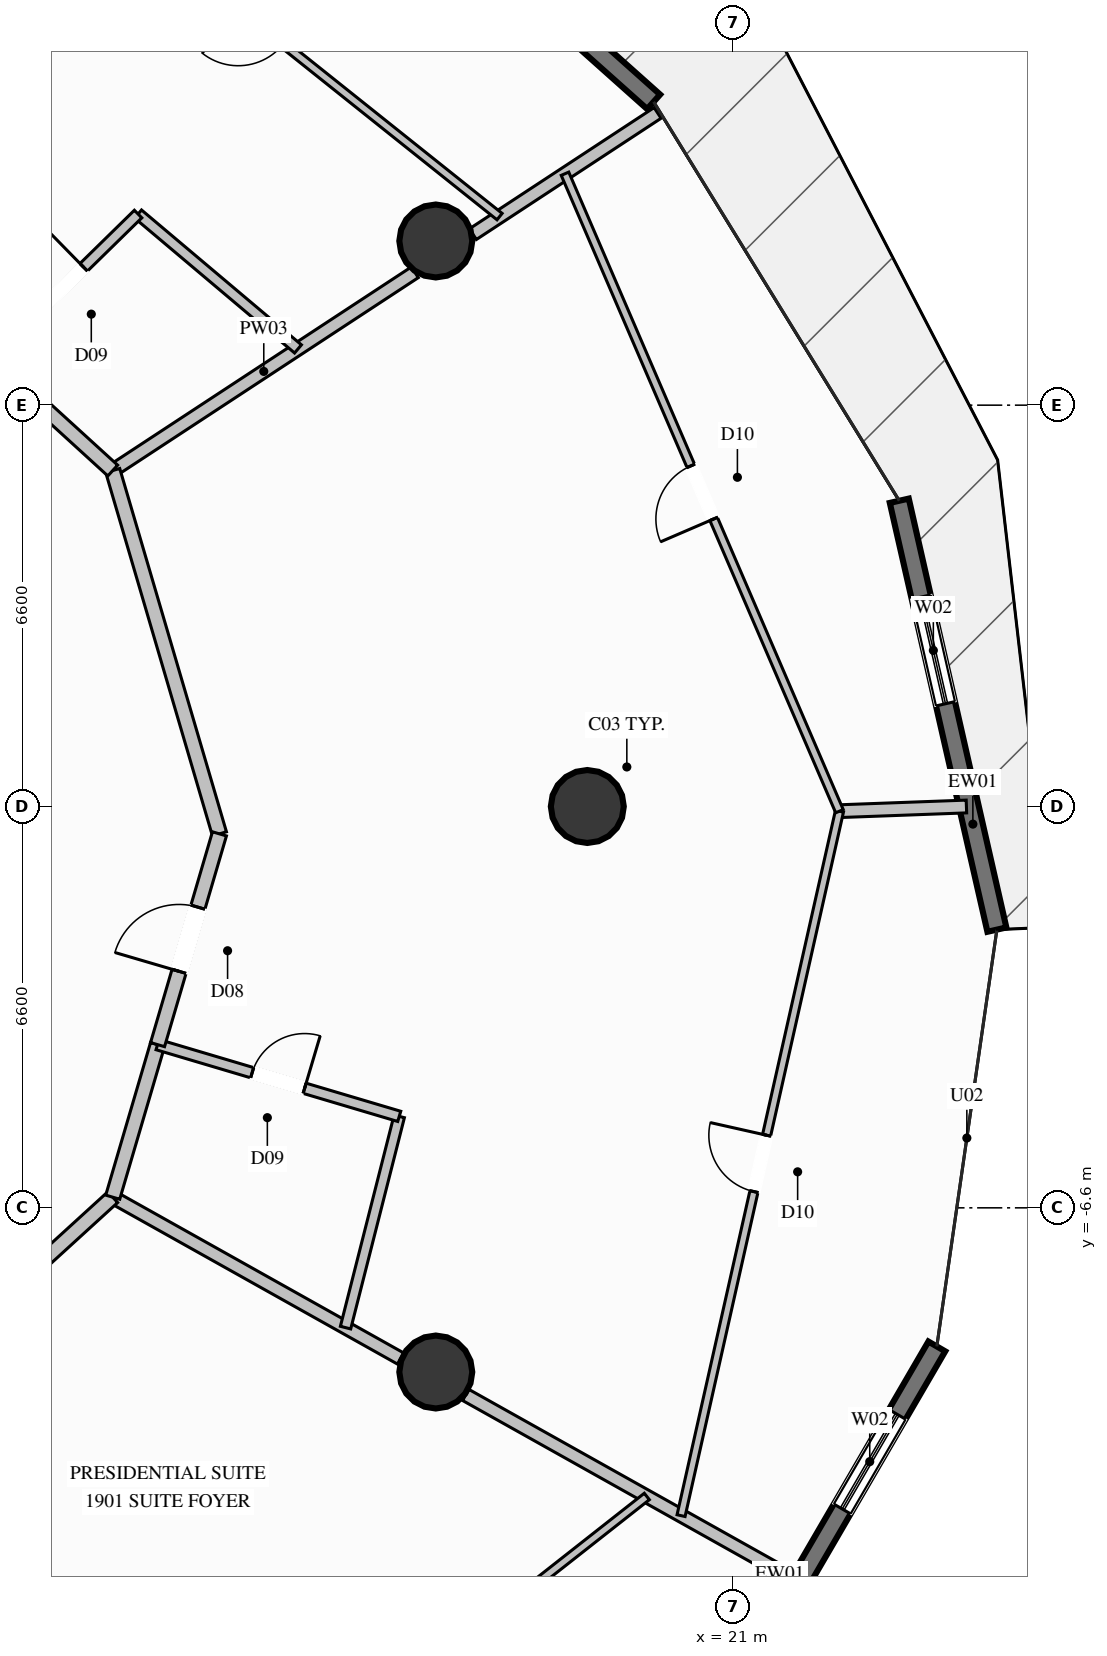
"""IFC4 building model, lengths in metres.
Left out: names, types, materials, properties, quantities, classifications, styles, units other than length and angle.
Written with IfcOpenShell. Run it as: python <this file> out.ifc"""

import sys

from ifc_helpers import new_model, si_unit, direction, frame, frame_2d, origin, origin_2d, place, context, subcontext, project, spatial, rectangle, circle, extrude, element, fill, save


model = new_model("IFC4")
c1 = context("Model", 3, precision=1e-05, world=origin(), true_north=direction((0.0, 1.0)))
c2 = subcontext(c1, "Body", "Model", "MODEL_VIEW")
j1 = project(units=[si_unit("LENGTHUNIT", "METRE"), si_unit("PLANEANGLEUNIT", "RADIAN")], contexts=[c1])
p1 = place(None, origin())
s1 = spatial("IfcSite", under=j1, at=p1, CompositionType="ELEMENT")
p2 = place(p1, origin())
s2 = spatial("IfcBuilding", under=s1, at=p2, CompositionType="ELEMENT")
p3 = place(p2, frame((0.0, 0.0, 71.6)))
s3 = spatial("IfcBuildingStorey", under=s2, at=p3, CompositionType="ELEMENT", Elevation=71.6)
for number, where, z_axis, x_axis in (
    (1, (18.6, 0.0, 0.0), (0.0, 0.0, 1.0), (1.0, 0.0, 0.0)),
    (2, (16.108, 9.3, 0.0), (0.0, 0.0, 1.0), (1.0, 0.0, 0.0)),
    (3, (16.108, -9.3, 0.0), (0.0, 0.0, 1.0), (1.0, 0.0, 0.0)),
):
    element("IfcColumn", number, at=place(p3, frame(where, z_axis=z_axis, x_axis=x_axis)), inside=s3, PredefinedType="COLUMN", context=c2, shape_type="SweptSolid", body=[
        extrude(circle(Radius=0.6, at=origin_2d()), origin(), (0.0, 0.0, 1.0), 3.6),
    ])
p4 = place(p3, frame((23.731, 5.028, 0.0), z_axis=(0.0, 0.0, 1.0), x_axis=(0.221888063911, -0.975072144558, 0.0)))
e4 = element("IfcWall", 4, at=p4, inside=s3, PredefinedType="SOLIDWALL", context=c2, shape_type="SweptSolid", body=[
    extrude(rectangle(XDim=7.233, YDim=0.32, at=frame_2d((3.617, 0.0))), origin(), (0.0, 0.0, 1.0), 3.34),
])
p5 = place(p4, frame((1.624, 0.0, 0.35)))
e5 = element("IfcOpeningElement", 5, at=p5, cuts=e4, PredefinedType="OPENING", context=c2, shape_type="SweptSolid", body=[
    extrude(rectangle(XDim=1.8, YDim=2.6, at=frame_2d((0.9, 1.3))), frame((0.0, 0.17, 0.0), z_axis=(0.0, -1.0, 0.0), x_axis=(1.0, 0.0, 0.0)), (0.0, 0.0, 1.0), 0.34),
])
p6 = place(p3, frame((13.61, 17.016, 0.0), z_axis=(0.0, 0.0, 1.0), x_axis=(0.746077425908, -0.665859200245, 0.0)))
e6 = element("IfcWall", 6, at=p6, inside=s3, PredefinedType="SOLIDWALL", context=c2, shape_type="SweptSolid", body=[
    extrude(rectangle(XDim=8.15, YDim=0.32, at=frame_2d((4.075, 0.0))), origin(), (0.0, 0.0, 1.0), 3.34),
])
p7 = place(p6, frame((3.175, 0.0, 0.35)))
e7 = element("IfcOpeningElement", 7, at=p7, cuts=e6, PredefinedType="OPENING", context=c2, shape_type="SweptSolid", body=[
    extrude(rectangle(XDim=1.8, YDim=2.6, at=frame_2d((0.9, 1.3))), frame((0.0, 0.17, 0.0), z_axis=(0.0, -1.0, 0.0), x_axis=(1.0, 0.0, 0.0)), (0.0, 0.0, 1.0), 0.34),
])
p8 = place(p3, frame((24.348, -8.879, 0.0), z_axis=(0.0, 0.0, 1.0), x_axis=(-0.503009446837, -0.864280912894, 0.0)))
e8 = element("IfcWall", 8, at=p8, inside=s3, PredefinedType="SOLIDWALL", context=c2, shape_type="SweptSolid", body=[
    extrude(rectangle(XDim=6.926, YDim=0.32, at=frame_2d((3.463, 0.0))), origin(), (0.0, 0.0, 1.0), 3.34),
])
p9 = place(p8, frame((1.293, 0.0, 0.35)))
e9 = element("IfcOpeningElement", 9, at=p9, cuts=e8, PredefinedType="OPENING", context=c2, shape_type="SweptSolid", body=[
    extrude(rectangle(XDim=1.8, YDim=2.6, at=frame_2d((0.9, 1.3))), frame((0.0, 0.17, 0.0), z_axis=(0.0, -1.0, 0.0), x_axis=(1.0, 0.0, 0.0)), (0.0, 0.0, 1.0), 0.34),
])
p10 = place(p3, frame((10.795, 5.525, 0.0), z_axis=(0.0, 0.0, 1.0), x_axis=(0.836067345727, 0.548626825273, 0.0)))
e10 = element("IfcWall", 10, at=p10, inside=s3, PredefinedType="PARTITIONING", context=c2, shape_type="SweptSolid", body=[
    extrude(rectangle(XDim=5.942, YDim=0.21, at=frame_2d((2.971, 0.0))), origin(), (0.0, 0.0, 1.0), 2.709),
])
p11 = place(p3, frame((16.718, 9.412, 0.0), z_axis=(0.0, 0.0, 1.0), x_axis=(0.836028649588, 0.548685790838, 0.0)))
e11 = element("IfcWall", 11, at=p11, inside=s3, PredefinedType="PARTITIONING", context=c2, shape_type="SweptSolid", body=[
    extrude(rectangle(XDim=3.634, YDim=0.21, at=frame_2d((1.817, 0.0))), origin(), (0.0, 0.0, 1.0), 3.34),
])
p12 = place(p3, frame((10.795, -6.425, 0.0), z_axis=(0.0, 0.0, 1.0), x_axis=(0.8723709625, -0.488844457662, 0.0)))
e12 = element("IfcWall", 12, at=p12, inside=s3, PredefinedType="PARTITIONING", context=c2, shape_type="SweptSolid", body=[
    extrude(rectangle(XDim=5.427, YDim=0.21, at=frame_2d((2.713, 0.0))), origin(), (0.0, 0.0, 1.0), 2.709),
])
p13 = place(p3, frame((16.6, -9.677, 0.0), z_axis=(0.0, 0.0, 1.0), x_axis=(0.872348901989, -0.488883823825, 0.0)))
e13 = element("IfcWall", 13, at=p13, inside=s3, PredefinedType="PARTITIONING", context=c2, shape_type="SweptSolid", body=[
    extrude(rectangle(XDim=6.255, YDim=0.21, at=frame_2d((3.128, 0.0))), origin(), (0.0, 0.0, 1.0), 3.34),
])
p14 = place(p3, frame((6.0, -10.799, 0.0), z_axis=(0.0, 0.0, 1.0), x_axis=(0.73878836807, 0.673937495028, 0.0)))
e14 = element("IfcWall", 14, at=p14, inside=s3, PredefinedType="PARTITIONING", context=c2, shape_type="SweptSolid", body=[
    extrude(rectangle(XDim=6.49, YDim=0.24, at=frame_2d((3.245, 0.0))), origin(), (0.0, 0.0, 1.0), 3.34),
])
p15 = place(p3, frame((10.584, -18.421, 0.0), z_axis=(0.0, 0.0, 1.0), x_axis=(0.78604730867, 0.618166343739, 0.0)))
e15 = element("IfcWall", 15, at=p15, inside=s3, PredefinedType="PARTITIONING", context=c2, shape_type="SweptSolid", body=[
    extrude(rectangle(XDim=11.443, YDim=0.135, at=frame_2d((5.722, 0.0))), origin(), (0.0, 0.0, 1.0), 3.34),
])
p16 = place(p15, frame((5.247, 0.0, 0.0)))
e16 = element("IfcOpeningElement", 16, at=p16, cuts=e15, PredefinedType="OPENING", context=c2, shape_type="SweptSolid", body=[
    extrude(rectangle(XDim=0.95, YDim=2.1, at=frame_2d((0.475, 1.05))), frame((0.0, 0.078, 0.0), z_axis=(0.0, -1.0, 0.0), x_axis=(1.0, 0.0, 0.0)), (0.0, 0.0, 1.0), 0.155),
])
p17 = place(p3, frame((10.795, -6.425, 0.0), z_axis=(0.0, 0.0, 1.0), x_axis=(0.281852929568, 0.959457620791, 0.0)))
e17 = element("IfcWall", 17, at=p17, inside=s3, PredefinedType="PARTITIONING", context=c2, shape_type="SweptSolid", body=[
    extrude(rectangle(XDim=2.615, YDim=0.24, at=frame_2d((1.308, 0.0))), origin(), (0.0, 0.0, 1.0), 3.34),
])
p18 = place(p3, frame((14.624, -8.57, 0.0), z_axis=(0.0, 0.0, 1.0), x_axis=(0.246347816962, 0.969181486141, 0.0)))
e18 = element("IfcWall", 18, at=p18, inside=s3, PredefinedType="PLUMBINGWALL", context=c2, shape_type="SweptSolid", body=[
    extrude(rectangle(XDim=3.584, YDim=0.175, at=frame_2d((1.792, 0.0))), origin(), (0.0, 0.0, 1.0), 3.34),
])
p19 = place(p3, frame((11.532, -3.916, 0.0), z_axis=(0.0, 0.0, 1.0), x_axis=(0.958658411313, -0.284559396995, 0.0)))
e19 = element("IfcWall", 19, at=p19, inside=s3, PredefinedType="PLUMBINGWALL", context=c2, shape_type="SweptSolid", body=[
    extrude(rectangle(XDim=4.146, YDim=0.175, at=frame_2d((2.073, 0.0))), origin(), (0.0, 0.0, 1.0), 3.34),
])
p20 = place(p19, frame((1.623, 0.0, 0.0)))
e20 = element("IfcOpeningElement", 20, at=p20, cuts=e19, PredefinedType="OPENING", context=c2, shape_type="SweptSolid", body=[
    extrude(rectangle(XDim=0.9, YDim=2.1, at=frame_2d((0.45, 1.05))), frame((0.0, 0.098, 0.0), z_axis=(0.0, -1.0, 0.0), x_axis=(1.0, 0.0, 0.0)), (0.0, 0.0, 1.0), 0.195),
])
p21 = place(p3, frame((22.747, -0.077, 0.0), z_axis=(0.0, 0.0, 1.0), x_axis=(0.9993223365, 0.036808528531, 0.0)))
e21 = element("IfcWall", 21, at=p21, inside=s3, PredefinedType="PARTITIONING", context=c2, shape_type="SweptSolid", body=[
    extrude(rectangle(XDim=2.089, YDim=0.21, at=frame_2d((1.045, 0.0))), origin(), (0.0, 0.0, 1.0), 3.34),
])
p22 = place(p3, frame((12.55, -0.45, 0.0), z_axis=(0.0, 0.0, 1.0), x_axis=(-0.281843679574, 0.959460338046, 0.0)))
e22 = element("IfcWall", 22, at=p22, inside=s3, PredefinedType="PARTITIONING", context=c2, shape_type="SweptSolid", body=[
    extrude(rectangle(XDim=6.227, YDim=0.24, at=frame_2d((3.114, 0.0))), origin(), (0.0, 0.0, 1.0), 2.917),
])
p23 = place(p3, frame((11.532, -3.916, 0.0), z_axis=(0.0, 0.0, 1.0), x_axis=(0.281818707972, 0.959467673159, 0.0)))
e23 = element("IfcWall", 23, at=p23, inside=s3, PredefinedType="PARTITIONING", context=c2, shape_type="SweptSolid", body=[
    extrude(rectangle(XDim=3.613, YDim=0.24, at=frame_2d((1.806, 0.0))), origin(), (0.0, 0.0, 1.0), 2.917),
])
p24 = place(p23, frame((1.256, 0.0, 0.0)))
e24 = element("IfcOpeningElement", 24, at=p24, cuts=e23, PredefinedType="OPENING", context=c2, shape_type="SweptSolid", body=[
    extrude(rectangle(XDim=1.1, YDim=2.3, at=frame_2d((0.55, 1.15))), frame((0.0, 0.13, 0.0), z_axis=(0.0, -1.0, 0.0), x_axis=(1.0, 0.0, 0.0)), (0.0, 0.0, 1.0), 0.26),
])
p25 = place(p3, frame((20.142, -11.662, 0.0), z_axis=(0.0, 0.0, 1.0), x_axis=(0.219376674663, 0.975640238312, 0.0)))
e25 = element("IfcWall", 25, at=p25, inside=s3, PredefinedType="PARTITIONING", context=c2, shape_type="SweptSolid", body=[
    extrude(rectangle(XDim=11.875, YDim=0.135, at=frame_2d((5.937, 0.0))), origin(), (0.0, 0.0, 1.0), 3.34),
])
p26 = place(p25, frame((5.462, 0.0, 0.0)))
e26 = element("IfcOpeningElement", 26, at=p26, cuts=e25, PredefinedType="OPENING", context=c2, shape_type="SweptSolid", body=[
    extrude(rectangle(XDim=0.95, YDim=2.1, at=frame_2d((0.475, 1.05))), frame((0.0, 0.078, 0.0), z_axis=(0.0, -1.0, 0.0), x_axis=(1.0, 0.0, 0.0)), (0.0, 0.0, 1.0), 0.155),
])
p27 = place(p3, frame((22.747, -0.077, 0.0), z_axis=(0.0, 0.0, 1.0), x_axis=(-0.395508976522, 0.918462111081, 0.0)))
e27 = element("IfcWall", 27, at=p27, inside=s3, PredefinedType="PARTITIONING", context=c2, shape_type="SweptSolid", body=[
    extrude(rectangle(XDim=11.414, YDim=0.135, at=frame_2d((5.707, 0.0))), origin(), (0.0, 0.0, 1.0), 3.34),
])
p28 = place(p27, frame((5.232, 0.0, 0.0)))
e28 = element("IfcOpeningElement", 28, at=p28, cuts=e27, PredefinedType="OPENING", context=c2, shape_type="SweptSolid", body=[
    extrude(rectangle(XDim=0.95, YDim=2.1, at=frame_2d((0.475, 1.05))), frame((0.0, 0.078, 0.0), z_axis=(0.0, -1.0, 0.0), x_axis=(1.0, 0.0, 0.0)), (0.0, 0.0, 1.0), 0.155),
])
p29 = place(p3, frame((10.795, 5.525, 0.0), z_axis=(0.0, 0.0, 1.0), x_axis=(-0.738784017848, 0.673942263827, 0.0)))
e29 = element("IfcWall", 29, at=p29, inside=s3, PredefinedType="PARTITIONING", context=c2, shape_type="SweptSolid", body=[
    extrude(rectangle(XDim=2.726, YDim=0.24, at=frame_2d((1.363, 0.0))), origin(), (0.0, 0.0, 1.0), 3.34),
])
p30 = place(p3, frame((13.842, 7.525, 0.0), z_axis=(0.0, 0.0, 1.0), x_axis=(-0.764456493043, 0.644675321572, 0.0)))
e30 = element("IfcWall", 30, at=p30, inside=s3, PredefinedType="PLUMBINGWALL", context=c2, shape_type="SweptSolid", body=[
    extrude(rectangle(XDim=3.44, YDim=0.175, at=frame_2d((1.72, 0.0))), origin(), (0.0, 0.0, 1.0), 3.34),
])
p31 = place(p3, frame((8.781, 7.362, 0.0), z_axis=(0.0, 0.0, 1.0), x_axis=(0.71442299397, 0.699714074238, 0.0)))
e31 = element("IfcWall", 31, at=p31, inside=s3, PredefinedType="PLUMBINGWALL", context=c2, shape_type="SweptSolid", body=[
    extrude(rectangle(XDim=3.403, YDim=0.175, at=frame_2d((1.701, 0.0))), origin(), (0.0, 0.0, 1.0), 2.709),
])
p32 = place(p31, frame((1.251, 0.0, 0.0)))
e32 = element("IfcOpeningElement", 32, at=p32, cuts=e31, PredefinedType="OPENING", context=c2, shape_type="SweptSolid", body=[
    extrude(rectangle(XDim=0.9, YDim=2.1, at=frame_2d((0.45, 1.05))), frame((0.0, 0.098, 0.0), z_axis=(0.0, -1.0, 0.0), x_axis=(1.0, 0.0, 0.0)), (0.0, 0.0, 1.0), 0.195),
])
p33 = place(p3, frame((17.157, 9.701, 0.0), z_axis=(0.0, 0.0, 1.0), x_axis=(-0.78155569477, 0.623835471878, 0.0)))
e33 = element("IfcWall", 33, at=p33, inside=s3, PredefinedType="PARTITIONING", context=c2, shape_type="SweptSolid", body=[
    extrude(rectangle(XDim=10.049, YDim=0.135, at=frame_2d((5.024, 0.0))), origin(), (0.0, 0.0, 1.0), 2.793),
])
p34 = place(p33, frame((4.55, 0.0, 0.0)))
e34 = element("IfcOpeningElement", 34, at=p34, cuts=e33, PredefinedType="OPENING", context=c2, shape_type="SweptSolid", body=[
    extrude(rectangle(XDim=0.95, YDim=2.1, at=frame_2d((0.475, 1.05))), frame((0.0, 0.078, 0.0), z_axis=(0.0, -1.0, 0.0), x_axis=(1.0, 0.0, 0.0)), (0.0, 0.0, 1.0), 0.155),
])
p35 = place(p5, origin())
e35 = element("IfcWindow", 35, at=p35, inside=s3, PartitioningType="SINGLE_PANEL", PredefinedType="WINDOW", context=c2, shape_type="SweptSolid", body=[
    extrude(rectangle(XDim=1.8, YDim=2.6, at=frame_2d((0.9, 1.3))), frame((0.0, 0.03, 0.0), z_axis=(0.0, -1.0, 0.0), x_axis=(1.0, 0.0, 0.0)), (0.0, 0.0, 1.0), 0.06),
])
fill(e5, e35)
p36 = place(p9, origin())
e36 = element("IfcWindow", 36, at=p36, inside=s3, PartitioningType="SINGLE_PANEL", PredefinedType="WINDOW", context=c2, shape_type="SweptSolid", body=[
    extrude(rectangle(XDim=1.8, YDim=2.6, at=frame_2d((0.9, 1.3))), frame((0.0, 0.03, 0.0), z_axis=(0.0, -1.0, 0.0), x_axis=(1.0, 0.0, 0.0)), (0.0, 0.0, 1.0), 0.06),
])
fill(e9, e36)
p37 = place(p20, origin())
e37 = element("IfcDoor", 37, at=p37, inside=s3, OperationType="SINGLE_SWING_RIGHT", PredefinedType="DOOR", context=c2, shape_type="SweptSolid", body=[
    extrude(rectangle(XDim=0.9, YDim=2.1, at=frame_2d((0.45, 1.05))), frame((0.0, 0.025, 0.0), z_axis=(0.0, -1.0, 0.0), x_axis=(1.0, 0.0, 0.0)), (0.0, 0.0, 1.0), 0.05),
])
fill(e20, e37)
p38 = place(p24, origin())
e38 = element("IfcDoor", 38, at=p38, inside=s3, OperationType="SINGLE_SWING_LEFT", PredefinedType="DOOR", context=c2, shape_type="SweptSolid", body=[
    extrude(rectangle(XDim=1.1, YDim=2.3, at=frame_2d((0.55, 1.15))), frame((0.0, 0.025, 0.0), z_axis=(0.0, -1.0, 0.0), x_axis=(1.0, 0.0, 0.0)), (0.0, 0.0, 1.0), 0.05),
])
fill(e24, e38)
p39 = place(p26, origin())
e39 = element("IfcDoor", 39, at=p39, inside=s3, OperationType="SINGLE_SWING_RIGHT", PredefinedType="DOOR", context=c2, shape_type="SweptSolid", body=[
    extrude(rectangle(XDim=0.95, YDim=2.1, at=frame_2d((0.475, 1.05))), frame((0.0, 0.025, 0.0), z_axis=(0.0, -1.0, 0.0), x_axis=(1.0, 0.0, 0.0)), (0.0, 0.0, 1.0), 0.05),
])
fill(e26, e39)
p40 = place(p28, origin())
e40 = element("IfcDoor", 40, at=p40, inside=s3, OperationType="SINGLE_SWING_LEFT", PredefinedType="DOOR", context=c2, shape_type="SweptSolid", body=[
    extrude(rectangle(XDim=0.95, YDim=2.1, at=frame_2d((0.475, 1.05))), frame((0.0, 0.025, 0.0), z_axis=(0.0, -1.0, 0.0), x_axis=(1.0, 0.0, 0.0)), (0.0, 0.0, 1.0), 0.05),
])
fill(e28, e40)
p41 = place(p32, origin())
e41 = element("IfcDoor", 41, at=p41, inside=s3, OperationType="SINGLE_SWING_RIGHT", PredefinedType="DOOR", context=c2, shape_type="SweptSolid", body=[
    extrude(rectangle(XDim=0.9, YDim=2.1, at=frame_2d((0.45, 1.05))), frame((0.0, 0.025, 0.0), z_axis=(0.0, -1.0, 0.0), x_axis=(1.0, 0.0, 0.0)), (0.0, 0.0, 1.0), 0.05),
])
fill(e32, e41)
save(model, sys.argv[1])
